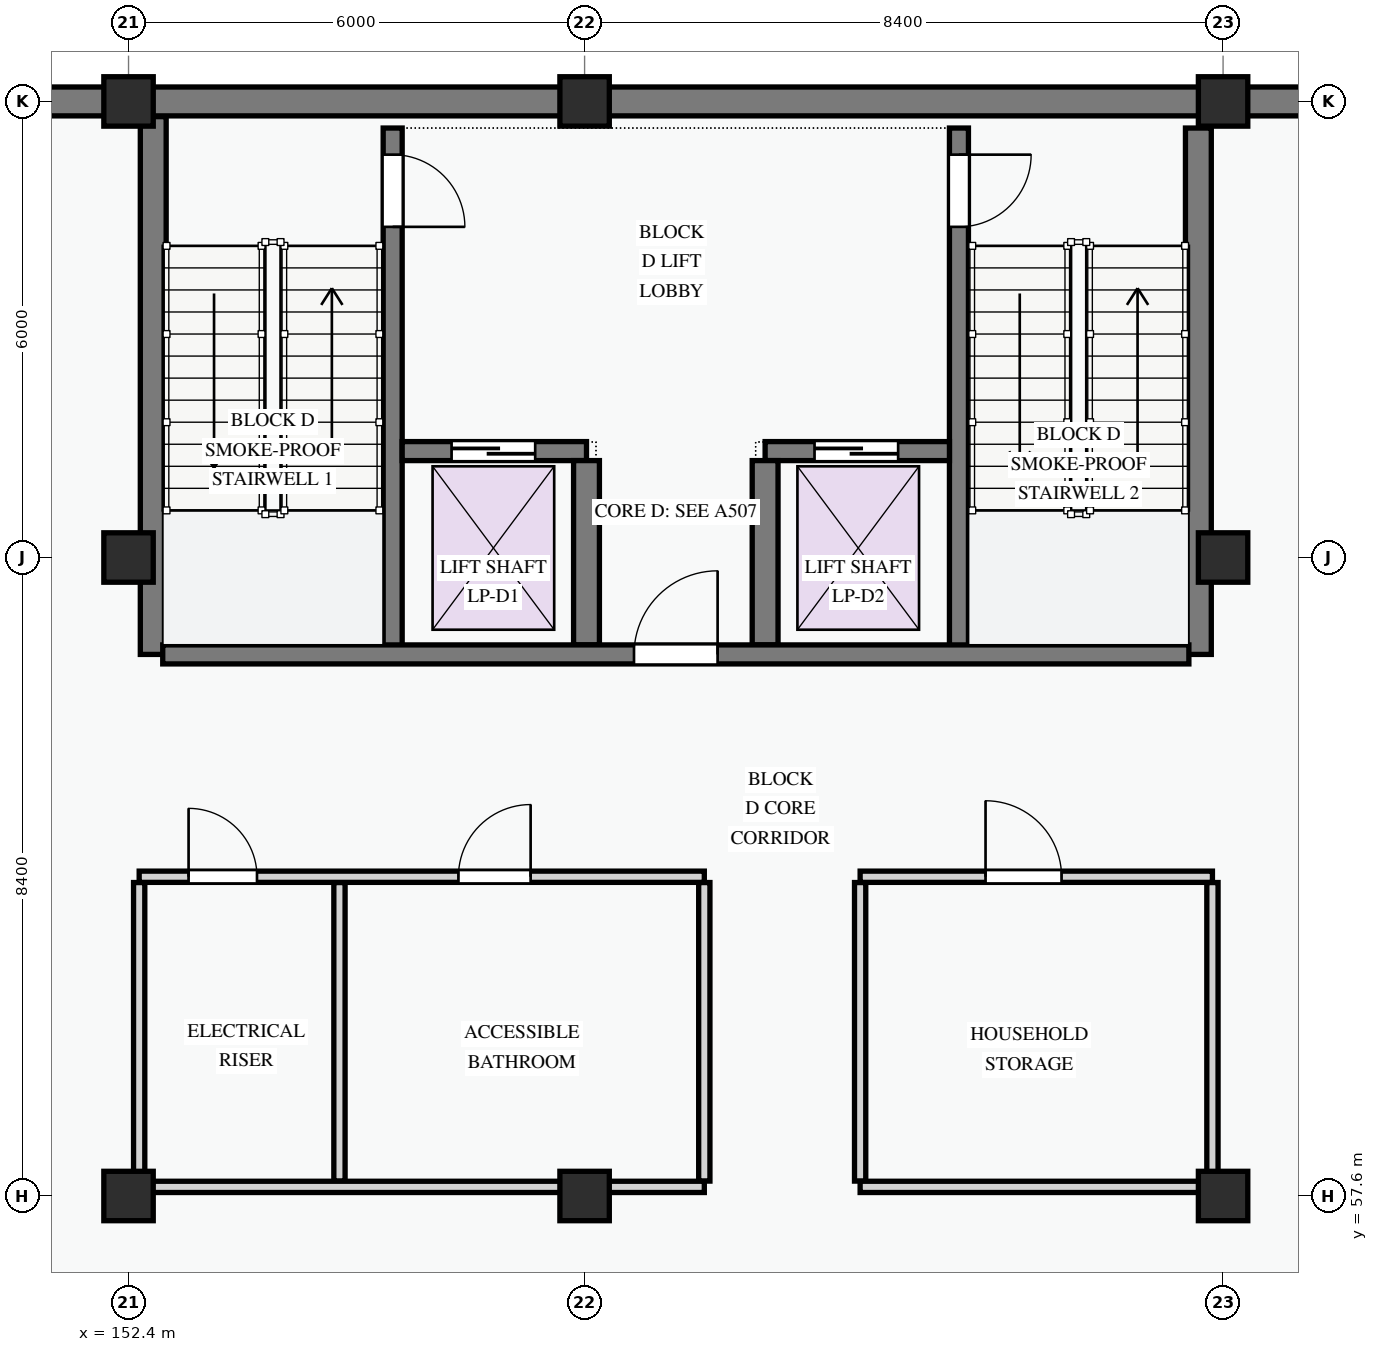
"""IFC4 building model, lengths in metres.
Left out: names, types, materials, properties, quantities, classifications, styles, units other than length and angle.
Written with IfcOpenShell. Run it as: python <this file> out.ifc"""

import sys

from ifc_helpers import new_model, si_unit, direction, frame, frame_2d, origin, origin_2d, place, context, subcontext, project, spatial, rectangle, extrude, element, fill, save


model = new_model("IFC4")
c1 = context("Model", 3, precision=1e-05, world=origin(), true_north=direction((0.0, 1.0)))
c2 = subcontext(c1, "Body", "Model", "MODEL_VIEW")
j1 = project(units=[si_unit("LENGTHUNIT", "METRE"), si_unit("PLANEANGLEUNIT", "RADIAN")], contexts=[c1])
p1 = place(None, origin())
s1 = spatial("IfcSite", under=j1, at=p1, CompositionType="ELEMENT")
p2 = place(p1, origin())
s2 = spatial("IfcBuilding", under=s1, at=p2, CompositionType="ELEMENT")
p3 = place(p2, frame((0.0, 0.0, -4.2)))
s3 = spatial("IfcBuildingStorey", under=s2, at=p3, CompositionType="ELEMENT", Elevation=-4.2)
for number, where, z_axis, x_axis in (
    (1, (152.4, 57.6, -0.45), (0.0, 0.0, 1.0), (1.0, 0.0, 0.0)),
    (2, (152.4, 66.0, -0.45), (0.0, 0.0, 1.0), (1.0, 0.0, 0.0)),
    (3, (152.4, 72.0, -0.45), (0.0, 0.0, 1.0), (1.0, 0.0, 0.0)),
    (4, (158.4, 57.6, -0.45), (0.0, 0.0, 1.0), (1.0, 0.0, 0.0)),
    (5, (158.4, 72.0, -0.45), (0.0, 0.0, 1.0), (1.0, 0.0, 0.0)),
    (6, (166.8, 57.6, -0.45), (0.0, 0.0, 1.0), (1.0, 0.0, 0.0)),
    (7, (166.8, 66.0, -0.45), (0.0, 0.0, 1.0), (1.0, 0.0, 0.0)),
    (8, (166.8, 72.0, -0.45), (0.0, 0.0, 1.0), (1.0, 0.0, 0.0)),
):
    element("IfcColumn", number, at=place(p3, frame(where, z_axis=z_axis, x_axis=x_axis)), inside=s3, PredefinedType="COLUMN", context=c2, shape_type="SweptSolid", body=[
        extrude(rectangle(XDim=0.65, YDim=0.65, at=origin_2d()), origin(), (0.0, 0.0, 1.0), 4.65),
    ])
p4 = place(p3, frame((152.4, 72.0, 0.0), z_axis=(0.0, 0.0, 1.0), x_axis=(-1.0, 0.0, 0.0)))
e9 = element("IfcWall", 9, at=p4, inside=s3, PredefinedType="SHEAR", context=c2, shape_type="SweptSolid", body=[
    extrude(rectangle(XDim=14.4, YDim=0.38, at=frame_2d((7.2, 0.0))), origin(), (0.0, 0.0, 1.0), 3.9),
])
p5 = place(p3, frame((174.0, 72.0, 0.0), z_axis=(0.0, 0.0, 1.0), x_axis=(-1.0, 0.0, 0.0)))
e10 = element("IfcWall", 10, at=p5, inside=s3, PredefinedType="SHEAR", context=c2, shape_type="SweptSolid", body=[
    extrude(rectangle(XDim=21.6, YDim=0.38, at=frame_2d((10.8, 0.0))), origin(), (0.0, 0.0, 1.0), 3.9),
])
p6 = place(p3, frame((155.875, 71.65, 0.0), z_axis=(0.0, 0.0, 1.0), x_axis=(0.0, -1.0, 0.0)))
e11 = element("IfcWall", 11, at=p6, inside=s3, PredefinedType="SHEAR", context=c2, shape_type="SweptSolid", body=[
    extrude(rectangle(XDim=6.925, YDim=0.25, at=frame_2d((3.462, 0.0))), origin(), (0.0, 0.0, 1.0), 3.9),
])
p7 = place(p6, frame((0.35, 0.0, 0.0)))
e12 = element("IfcOpeningElement", 12, at=p7, cuts=e11, PredefinedType="OPENING", context=c2, shape_type="SweptSolid", body=[
    extrude(rectangle(XDim=0.95, YDim=2.1, at=frame_2d((0.475, 1.05))), frame((0.0, 0.135, 0.0), z_axis=(0.0, -1.0, 0.0), x_axis=(1.0, 0.0, 0.0)), (0.0, 0.0, 1.0), 0.27),
])
p8 = place(p3, frame((152.725, 71.8, 0.0), z_axis=(0.0, 0.0, 1.0), x_axis=(0.0, -1.0, 0.0)))
e13 = element("IfcWall", 13, at=p8, inside=s3, PredefinedType="SHEAR", context=c2, shape_type="SweptSolid", body=[
    extrude(rectangle(XDim=7.075, YDim=0.34, at=frame_2d((3.538, 0.0))), origin(), (0.0, 0.0, 1.0), 3.9),
])
p9 = place(p3, frame((166.475, 71.65, 0.0), z_axis=(0.0, 0.0, 1.0), x_axis=(0.0, -1.0, 0.0)))
e14 = element("IfcWall", 14, at=p9, inside=s3, PredefinedType="SHEAR", context=c2, shape_type="SweptSolid", body=[
    extrude(rectangle(XDim=6.925, YDim=0.34, at=frame_2d((3.462, 0.0))), origin(), (0.0, 0.0, 1.0), 3.9),
])
p10 = place(p3, frame((163.325, 71.65, 0.0), z_axis=(0.0, 0.0, 1.0), x_axis=(0.0, -1.0, 0.0)))
e15 = element("IfcWall", 15, at=p10, inside=s3, PredefinedType="SHEAR", context=c2, shape_type="SweptSolid", body=[
    extrude(rectangle(XDim=6.925, YDim=0.25, at=frame_2d((3.462, 0.0))), origin(), (0.0, 0.0, 1.0), 3.9),
])
p11 = place(p10, frame((0.35, 0.0, 0.0)))
e16 = element("IfcOpeningElement", 16, at=p11, cuts=e15, PredefinedType="OPENING", context=c2, shape_type="SweptSolid", body=[
    extrude(rectangle(XDim=0.95, YDim=2.1, at=frame_2d((0.475, 1.05))), frame((0.0, 0.135, 0.0), z_axis=(0.0, -1.0, 0.0), x_axis=(1.0, 0.0, 0.0)), (0.0, 0.0, 1.0), 0.27),
])
p12 = place(p3, frame((156.0, 67.4, 0.0), z_axis=(0.0, 0.0, 1.0), x_axis=(1.0, 0.0, 0.0)))
e17 = element("IfcWall", 17, at=p12, inside=s3, PredefinedType="SHEAR", context=c2, shape_type="SweptSolid", body=[
    extrude(rectangle(XDim=2.425, YDim=0.25, at=frame_2d((1.212, 0.0))), origin(), (0.0, 0.0, 1.0), 3.9),
])
p13 = place(p12, frame((0.65, 0.0, 0.0)))
e18 = element("IfcOpeningElement", 18, at=p13, cuts=e17, PredefinedType="OPENING", context=c2, shape_type="SweptSolid", body=[
    extrude(rectangle(XDim=1.1, YDim=2.15, at=frame_2d((0.55, 1.075))), frame((0.0, 0.135, 0.0), z_axis=(0.0, -1.0, 0.0), x_axis=(1.0, 0.0, 0.0)), (0.0, 0.0, 1.0), 0.27),
])
p14 = place(p3, frame((160.775, 67.4, 0.0), z_axis=(0.0, 0.0, 1.0), x_axis=(1.0, 0.0, 0.0)))
e19 = element("IfcWall", 19, at=p14, inside=s3, PredefinedType="SHEAR", context=c2, shape_type="SweptSolid", body=[
    extrude(rectangle(XDim=2.425, YDim=0.25, at=frame_2d((1.212, 0.0))), origin(), (0.0, 0.0, 1.0), 3.9),
])
p15 = place(p14, frame((0.65, 0.0, 0.0)))
e20 = element("IfcOpeningElement", 20, at=p15, cuts=e19, PredefinedType="OPENING", context=c2, shape_type="SweptSolid", body=[
    extrude(rectangle(XDim=1.1, YDim=2.15, at=frame_2d((0.55, 1.075))), frame((0.0, 0.135, 0.0), z_axis=(0.0, -1.0, 0.0), x_axis=(1.0, 0.0, 0.0)), (0.0, 0.0, 1.0), 0.27),
])
for number, where, z_axis, x_axis in (
    (21, (158.425, 67.275, 0.0), (0.0, 0.0, 1.0), (0.0, -1.0, 0.0)),
    (22, (160.775, 67.275, 0.0), (0.0, 0.0, 1.0), (0.0, -1.0, 0.0)),
):
    element("IfcWall", number, at=place(p3, frame(where, z_axis=z_axis, x_axis=x_axis)), inside=s3, PredefinedType="SHEAR", context=c2, shape_type="SweptSolid", body=[
        extrude(rectangle(XDim=2.425, YDim=0.34, at=frame_2d((1.212, 0.0))), origin(), (0.0, 0.0, 1.0), 3.9),
    ])
p16 = place(p3, frame((152.85, 64.725, 0.0), z_axis=(0.0, 0.0, 1.0), x_axis=(1.0, 0.0, 0.0)))
e23 = element("IfcWall", 23, at=p16, inside=s3, PredefinedType="SHEAR", context=c2, shape_type="SweptSolid", body=[
    extrude(rectangle(XDim=13.5, YDim=0.25, at=frame_2d((6.75, 0.0))), origin(), (0.0, 0.0, 1.0), 3.9),
])
p17 = place(p16, frame((6.2, 0.0, 0.0)))
e24 = element("IfcOpeningElement", 24, at=p17, cuts=e23, PredefinedType="OPENING", context=c2, shape_type="SweptSolid", body=[
    extrude(rectangle(XDim=1.1, YDim=2.15, at=frame_2d((0.55, 1.075))), frame((0.0, 0.135, 0.0), z_axis=(0.0, -1.0, 0.0), x_axis=(1.0, 0.0, 0.0)), (0.0, 0.0, 1.0), 0.27),
])
p18 = place(p3, frame((152.54, 61.724, 0.0), z_axis=(0.0, 0.0, 1.0), x_axis=(0.0, -1.0, 0.0)))
e25 = element("IfcWall", 25, at=p18, inside=s3, PredefinedType="PARTITIONING", context=c2, shape_type="SweptSolid", body=[
    extrude(rectangle(XDim=3.928, YDim=0.148, at=frame_2d((1.964, 0.0))), origin(), (0.0, 0.0, 1.0), 3.185),
])
for number, where, z_axis, x_axis in (
    (26, (155.175, 61.724, 0.0), (0.0, 0.0, 1.0), (0.0, -1.0, 0.0)),
    (27, (159.975, 61.724, 0.0), (0.0, 0.0, 1.0), (0.0, -1.0, 0.0)),
    (28, (162.025, 61.724, 0.0), (0.0, 0.0, 1.0), (0.0, -1.0, 0.0)),
):
    element("IfcWall", number, at=place(p3, frame(where, z_axis=z_axis, x_axis=x_axis)), inside=s3, PredefinedType="PARTITIONING", context=c2, shape_type="SweptSolid", body=[
        extrude(rectangle(XDim=3.928, YDim=0.148, at=frame_2d((1.964, 0.0))), origin(), (0.0, 0.0, 1.0), 3.9),
    ])
p19 = place(p3, frame((166.66, 61.724, 0.0), z_axis=(0.0, 0.0, 1.0), x_axis=(0.0, -1.0, 0.0)))
e29 = element("IfcWall", 29, at=p19, inside=s3, PredefinedType="PARTITIONING", context=c2, shape_type="SweptSolid", body=[
    extrude(rectangle(XDim=3.928, YDim=0.148, at=frame_2d((1.964, 0.0))), origin(), (0.0, 0.0, 1.0), 3.185),
])
p20 = place(p3, frame((152.54, 61.8, 0.0), z_axis=(0.0, 0.0, 1.0), x_axis=(1.0, 0.0, 0.0)))
e30 = element("IfcWall", 30, at=p20, inside=s3, PredefinedType="PARTITIONING", context=c2, shape_type="SweptSolid", body=[
    extrude(rectangle(XDim=7.435, YDim=0.148, at=frame_2d((3.718, 0.0))), origin(), (0.0, 0.0, 1.0), 3.9),
])
p21 = place(p20, frame((0.65, 0.0, 0.0)))
e31 = element("IfcOpeningElement", 31, at=p21, cuts=e30, PredefinedType="OPENING", context=c2, shape_type="SweptSolid", body=[
    extrude(rectangle(XDim=0.9, YDim=2.1, at=frame_2d((0.45, 1.05))), frame((0.0, 0.084, 0.0), z_axis=(0.0, -1.0, 0.0), x_axis=(1.0, 0.0, 0.0)), (0.0, 0.0, 1.0), 0.168),
])
p22 = place(p20, frame((4.2, 0.0, 0.0)))
e32 = element("IfcOpeningElement", 32, at=p22, cuts=e30, PredefinedType="OPENING", context=c2, shape_type="SweptSolid", body=[
    extrude(rectangle(XDim=0.95, YDim=2.1, at=frame_2d((0.475, 1.05))), frame((0.0, 0.084, 0.0), z_axis=(0.0, -1.0, 0.0), x_axis=(1.0, 0.0, 0.0)), (0.0, 0.0, 1.0), 0.168),
])
p23 = place(p3, frame((162.025, 61.8, 0.0), z_axis=(0.0, 0.0, 1.0), x_axis=(1.0, 0.0, 0.0)))
e33 = element("IfcWall", 33, at=p23, inside=s3, PredefinedType="PARTITIONING", context=c2, shape_type="SweptSolid", body=[
    extrude(rectangle(XDim=4.635, YDim=0.148, at=frame_2d((2.317, 0.0))), origin(), (0.0, 0.0, 1.0), 3.9),
])
p24 = place(p23, frame((1.65, 0.0, 0.0)))
e34 = element("IfcOpeningElement", 34, at=p24, cuts=e33, PredefinedType="OPENING", context=c2, shape_type="SweptSolid", body=[
    extrude(rectangle(XDim=1.0, YDim=2.15, at=frame_2d((0.5, 1.075))), frame((0.0, 0.084, 0.0), z_axis=(0.0, -1.0, 0.0), x_axis=(1.0, 0.0, 0.0)), (0.0, 0.0, 1.0), 0.168),
])
p25 = place(p3, frame((152.54, 57.72, 0.0), z_axis=(0.0, 0.0, 1.0), x_axis=(1.0, 0.0, 0.0)))
e35 = element("IfcWall", 35, at=p25, inside=s3, PredefinedType="PARTITIONING", context=c2, shape_type="SweptSolid", body=[
    extrude(rectangle(XDim=7.435, YDim=0.148, at=frame_2d((3.718, 0.0))), origin(), (0.0, 0.0, 1.0), 3.185),
])
p26 = place(p3, frame((162.025, 57.72, 0.0), z_axis=(0.0, 0.0, 1.0), x_axis=(1.0, 0.0, 0.0)))
e36 = element("IfcWall", 36, at=p26, inside=s3, PredefinedType="PARTITIONING", context=c2, shape_type="SweptSolid", body=[
    extrude(rectangle(XDim=4.635, YDim=0.148, at=frame_2d((2.317, 0.0))), origin(), (0.0, 0.0, 1.0), 3.185),
])
p27 = place(p7, origin())
e37 = element("IfcDoor", 37, at=p27, inside=s3, OperationType="SINGLE_SWING_RIGHT", PredefinedType="DOOR", context=c2, shape_type="SweptSolid", body=[
    extrude(rectangle(XDim=0.95, YDim=2.1, at=frame_2d((0.475, 1.05))), frame((0.0, 0.025, 0.0), z_axis=(0.0, -1.0, 0.0), x_axis=(1.0, 0.0, 0.0)), (0.0, 0.0, 1.0), 0.05),
])
fill(e12, e37)
p28 = place(p11, origin())
e38 = element("IfcDoor", 38, at=p28, inside=s3, OperationType="SINGLE_SWING_LEFT", PredefinedType="DOOR", context=c2, shape_type="SweptSolid", body=[
    extrude(rectangle(XDim=0.95, YDim=2.1, at=frame_2d((0.475, 1.05))), frame((0.0, 0.025, 0.0), z_axis=(0.0, -1.0, 0.0), x_axis=(1.0, 0.0, 0.0)), (0.0, 0.0, 1.0), 0.05),
])
fill(e16, e38)
p29 = place(p13, origin())
e39 = element("IfcDoor", 39, at=p29, inside=s3, OperationType="SLIDING_TO_LEFT", PredefinedType="DOOR", context=c2, shape_type="SweptSolid", body=[
    extrude(rectangle(XDim=1.1, YDim=2.15, at=frame_2d((0.55, 1.075))), frame((0.0, 0.025, 0.0), z_axis=(0.0, -1.0, 0.0), x_axis=(1.0, 0.0, 0.0)), (0.0, 0.0, 1.0), 0.05),
])
fill(e18, e39)
p30 = place(p15, origin())
e40 = element("IfcDoor", 40, at=p30, inside=s3, OperationType="SLIDING_TO_LEFT", PredefinedType="DOOR", context=c2, shape_type="SweptSolid", body=[
    extrude(rectangle(XDim=1.1, YDim=2.15, at=frame_2d((0.55, 1.075))), frame((0.0, 0.025, 0.0), z_axis=(0.0, -1.0, 0.0), x_axis=(1.0, 0.0, 0.0)), (0.0, 0.0, 1.0), 0.05),
])
fill(e20, e40)
p31 = place(p17, origin())
e41 = element("IfcDoor", 41, at=p31, inside=s3, OperationType="SINGLE_SWING_RIGHT", PredefinedType="DOOR", context=c2, shape_type="SweptSolid", body=[
    extrude(rectangle(XDim=1.1, YDim=2.15, at=frame_2d((0.55, 1.075))), frame((0.0, 0.025, 0.0), z_axis=(0.0, -1.0, 0.0), x_axis=(1.0, 0.0, 0.0)), (0.0, 0.0, 1.0), 0.05),
])
fill(e24, e41)
p32 = place(p21, origin())
e42 = element("IfcDoor", 42, at=p32, inside=s3, OperationType="SINGLE_SWING_LEFT", PredefinedType="DOOR", context=c2, shape_type="SweptSolid", body=[
    extrude(rectangle(XDim=0.9, YDim=2.1, at=frame_2d((0.45, 1.05))), frame((0.0, 0.025, 0.0), z_axis=(0.0, -1.0, 0.0), x_axis=(1.0, 0.0, 0.0)), (0.0, 0.0, 1.0), 0.05),
])
fill(e31, e42)
p33 = place(p22, origin())
e43 = element("IfcDoor", 43, at=p33, inside=s3, OperationType="SINGLE_SWING_RIGHT", PredefinedType="DOOR", context=c2, shape_type="SweptSolid", body=[
    extrude(rectangle(XDim=0.95, YDim=2.1, at=frame_2d((0.475, 1.05))), frame((0.0, 0.025, 0.0), z_axis=(0.0, -1.0, 0.0), x_axis=(1.0, 0.0, 0.0)), (0.0, 0.0, 1.0), 0.05),
])
fill(e32, e43)
p34 = place(p24, origin())
e44 = element("IfcDoor", 44, at=p34, inside=s3, OperationType="SINGLE_SWING_LEFT", PredefinedType="DOOR", context=c2, shape_type="SweptSolid", body=[
    extrude(rectangle(XDim=1.0, YDim=2.15, at=frame_2d((0.5, 1.075))), frame((0.0, 0.025, 0.0), z_axis=(0.0, -1.0, 0.0), x_axis=(1.0, 0.0, 0.0)), (0.0, 0.0, 1.0), 0.05),
])
fill(e34, e44)
save(model, sys.argv[1])
